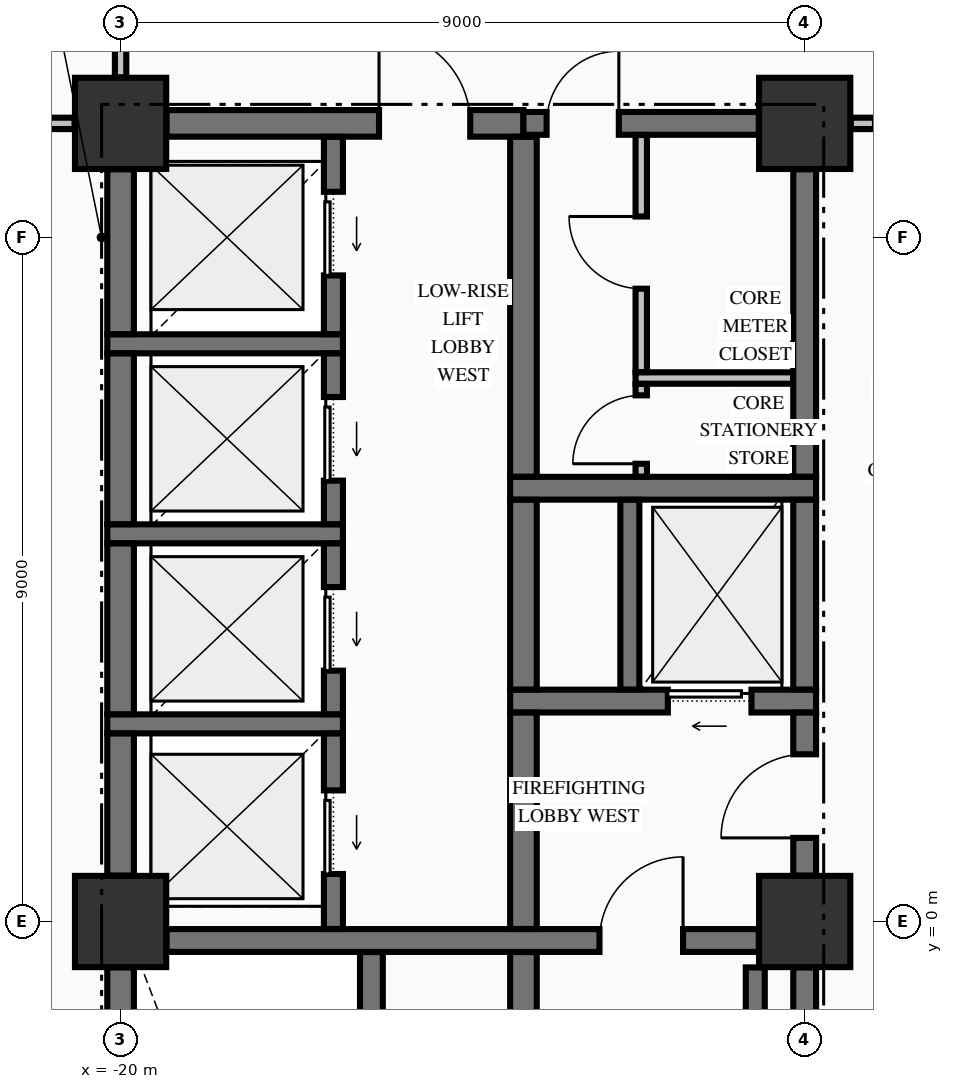
"""IFC4 building model, lengths in metres.
Left out: names, types, materials, properties, quantities, classifications, styles, units other than length and angle.
Written with IfcOpenShell. Run it as: python <this file> out.ifc"""

import sys

from ifc_helpers import new_model, si_unit, direction, frame, frame_2d, origin, origin_2d, place, context, subcontext, project, spatial, rectangle, extrude, element, fill, save


model = new_model("IFC4")
c1 = context("Model", 3, precision=1e-05, world=origin(), true_north=direction((0.0, 1.0)))
c2 = subcontext(c1, "Body", "Model", "MODEL_VIEW")
j1 = project(units=[si_unit("LENGTHUNIT", "METRE"), si_unit("PLANEANGLEUNIT", "RADIAN")], contexts=[c1])
p1 = place(None, origin())
s1 = spatial("IfcSite", under=j1, at=p1, CompositionType="ELEMENT")
p2 = place(p1, origin())
s2 = spatial("IfcBuilding", under=s1, at=p2, CompositionType="ELEMENT")
p3 = place(p2, frame((0.0, 0.0, 71.47)))
s3 = spatial("IfcBuildingStorey", under=s2, at=p3, CompositionType="ELEMENT", Elevation=71.47)
for number, where, z_axis, x_axis in (
    (1, (-20.0, 10.5, -0.325), (0.0, 0.0, 1.0), (1.0, 0.0, 0.0)),
    (2, (-11.0, 0.0, -0.325), (0.0, 0.0, 1.0), (1.0, 0.0, 0.0)),
    (3, (-11.0, 10.5, -0.325), (0.0, 0.0, 1.0), (1.0, 0.0, 0.0)),
    (4, (-20.0, 0.0, -0.325), (0.0, 0.0, 1.0), (1.0, 0.0, 0.0)),
):
    element("IfcColumn", number, at=place(p3, frame(where, z_axis=z_axis, x_axis=x_axis)), inside=s3, PredefinedType="COLUMN", context=c2, shape_type="SweptSolid", body=[
        extrude(rectangle(XDim=1.2, YDim=1.2, at=origin_2d()), origin(), (0.0, 0.0, 1.0), 3.645),
    ])
p4 = place(p3, frame((-19.396, -0.25, 0.0), z_axis=(0.0, 0.0, 1.0), x_axis=(1.0, 0.0, 0.0)))
e5 = element("IfcWall", 5, at=p4, inside=s3, PredefinedType="SHEAR", context=c2, shape_type="SweptSolid", body=[
    extrude(rectangle(XDim=7.792, YDim=0.3, at=frame_2d((3.896, 0.0))), origin(), (0.0, 0.0, 1.0), 3.32),
])
p5 = place(p4, frame((5.696, 0.0, 0.0)))
e6 = element("IfcOpeningElement", 6, at=p5, cuts=e5, PredefinedType="OPENING", context=c2, shape_type="SweptSolid", body=[
    extrude(rectangle(XDim=1.1, YDim=2.15, at=frame_2d((0.55, 1.075))), frame((0.0, 0.16, 0.0), z_axis=(0.0, -1.0, 0.0), x_axis=(1.0, 0.0, 0.0)), (0.0, 0.0, 1.0), 0.32),
])
p6 = place(p3, frame((-20.175, 2.6, 0.0), z_axis=(0.0, 0.0, 1.0), x_axis=(1.0, 0.0, 0.0)))
e7 = element("IfcWall", 7, at=p6, inside=s3, PredefinedType="SOLIDWALL", context=c2, shape_type="SweptSolid", body=[
    extrude(rectangle(XDim=3.1, YDim=0.25, at=frame_2d((1.55, 0.0))), origin(), (0.0, 0.0, 1.0), 3.32),
])
p7 = place(p3, frame((-14.875, 2.9, 0.0), z_axis=(0.0, 0.0, 1.0), x_axis=(1.0, 0.0, 0.0)))
e8 = element("IfcWall", 8, at=p7, inside=s3, PredefinedType="SHEAR", context=c2, shape_type="SweptSolid", body=[
    extrude(rectangle(XDim=4.025, YDim=0.3, at=frame_2d((2.012, 0.0))), origin(), (0.0, 0.0, 1.0), 3.32),
])
p8 = place(p7, frame((2.075, 0.0, 0.0)))
e9 = element("IfcOpeningElement", 9, at=p8, cuts=e8, PredefinedType="OPENING", context=c2, shape_type="SweptSolid", body=[
    extrude(rectangle(XDim=1.1, YDim=2.2, at=frame_2d((0.55, 1.1))), frame((0.0, 0.16, 0.0), z_axis=(0.0, -1.0, 0.0), x_axis=(1.0, 0.0, 0.0)), (0.0, 0.0, 1.0), 0.32),
])
p9 = place(p3, frame((-20.175, 5.1, 0.0), z_axis=(0.0, 0.0, 1.0), x_axis=(1.0, 0.0, 0.0)))
e10 = element("IfcWall", 10, at=p9, inside=s3, PredefinedType="SOLIDWALL", context=c2, shape_type="SweptSolid", body=[
    extrude(rectangle(XDim=3.1, YDim=0.25, at=frame_2d((1.55, 0.0))), origin(), (0.0, 0.0, 1.0), 3.32),
])
p10 = place(p3, frame((-14.875, 5.7, 0.0), z_axis=(0.0, 0.0, 1.0), x_axis=(1.0, 0.0, 0.0)))
e11 = element("IfcWall", 11, at=p10, inside=s3, PredefinedType="SHEAR", context=c2, shape_type="SweptSolid", body=[
    extrude(rectangle(XDim=4.025, YDim=0.3, at=frame_2d((2.012, 0.0))), origin(), (0.0, 0.0, 1.0), 3.32),
])
p11 = place(p3, frame((-20.175, 7.6, 0.0), z_axis=(0.0, 0.0, 1.0), x_axis=(1.0, 0.0, 0.0)))
e12 = element("IfcWall", 12, at=p11, inside=s3, PredefinedType="SOLIDWALL", context=c2, shape_type="SweptSolid", body=[
    extrude(rectangle(XDim=3.1, YDim=0.25, at=frame_2d((1.55, 0.0))), origin(), (0.0, 0.0, 1.0), 3.32),
])
p12 = place(p3, frame((-19.396, 10.5, 0.0), z_axis=(0.0, 0.0, 1.0), x_axis=(1.0, 0.0, 0.0)))
e13 = element("IfcWall", 13, at=p12, inside=s3, PredefinedType="SHEAR", context=c2, shape_type="SweptSolid", body=[
    extrude(rectangle(XDim=4.696, YDim=0.35, at=frame_2d((2.348, 0.0))), origin(), (0.0, 0.0, 1.0), 3.32),
])
p13 = place(p12, frame((2.796, 0.0, 0.0)))
e14 = element("IfcOpeningElement", 14, at=p13, cuts=e13, PredefinedType="OPENING", context=c2, shape_type="SweptSolid", body=[
    extrude(rectangle(XDim=1.2, YDim=2.15, at=frame_2d((0.6, 1.075))), frame((0.0, 0.185, 0.0), z_axis=(0.0, -1.0, 0.0), x_axis=(1.0, 0.0, 0.0)), (0.0, 0.0, 1.0), 0.37),
])
p14 = place(p3, frame((-14.7, 10.5, 0.0), z_axis=(0.0, 0.0, 1.0), x_axis=(1.0, 0.0, 0.0)))
e15 = element("IfcWall", 15, at=p14, inside=s3, PredefinedType="SHEAR", context=c2, shape_type="SweptSolid", body=[
    extrude(rectangle(XDim=3.096, YDim=0.3, at=frame_2d((1.548, 0.0))), origin(), (0.0, 0.0, 1.0), 3.32),
])
p15 = place(p14, frame((0.305, 0.0, 0.0)))
e16 = element("IfcOpeningElement", 16, at=p15, cuts=e15, PredefinedType="OPENING", context=c2, shape_type="SweptSolid", body=[
    extrude(rectangle(XDim=0.95, YDim=2.15, at=frame_2d((0.475, 1.075))), frame((0.0, 0.16, 0.0), z_axis=(0.0, -1.0, 0.0), x_axis=(1.0, 0.0, 0.0)), (0.0, 0.0, 1.0), 0.32),
])
p16 = place(p3, frame((-13.225, 7.15, 0.0), z_axis=(0.0, 0.0, 1.0), x_axis=(1.0, 0.0, 0.0)))
e17 = element("IfcWall", 17, at=p16, inside=s3, PredefinedType="PARTITIONING", context=c2, shape_type="SweptSolid", body=[
    extrude(rectangle(XDim=2.072, YDim=0.15, at=frame_2d((1.036, 0.0))), origin(), (0.0, 0.0, 1.0), 3.32),
])
p17 = place(p3, frame((-28.835, 10.5, 0.0), z_axis=(0.0, 0.0, 1.0), x_axis=(1.0, 0.0, 0.0)))
e18 = element("IfcWall", 18, at=p17, inside=s3, PredefinedType="PARTITIONING", context=c2, shape_type="SweptSolid", body=[
    extrude(rectangle(XDim=8.229, YDim=0.15, at=frame_2d((4.115, 0.0))), origin(), (0.0, 0.0, 1.0), 3.32),
])
p18 = place(p17, frame((3.86, 0.0, 0.0)))
e19 = element("IfcOpeningElement", 19, at=p18, cuts=e18, PredefinedType="OPENING", context=c2, shape_type="SweptSolid", body=[
    extrude(rectangle(XDim=0.95, YDim=2.15, at=frame_2d((0.475, 1.075))), frame((0.0, 0.085, 0.0), z_axis=(0.0, -1.0, 0.0), x_axis=(1.0, 0.0, 0.0)), (0.0, 0.0, 1.0), 0.17),
])
p19 = place(p3, frame((-10.394, 10.5, 0.0), z_axis=(0.0, 0.0, 1.0), x_axis=(1.0, 0.0, 0.0)))
e20 = element("IfcWall", 20, at=p19, inside=s3, PredefinedType="PARTITIONING", context=c2, shape_type="SweptSolid", body=[
    extrude(rectangle(XDim=20.788, YDim=0.15, at=frame_2d((10.394, 0.0))), origin(), (0.0, 0.0, 1.0), 3.32),
])
p20 = place(p19, frame((0.319, 0.0, 0.0)))
e21 = element("IfcOpeningElement", 21, at=p20, cuts=e20, PredefinedType="OPENING", context=c2, shape_type="SweptSolid", body=[
    extrude(rectangle(XDim=1.05, YDim=2.15, at=frame_2d((0.525, 1.075))), frame((0.0, 0.085, 0.0), z_axis=(0.0, -1.0, 0.0), x_axis=(1.0, 0.0, 0.0)), (0.0, 0.0, 1.0), 0.17),
])
p21 = place(p19, frame((19.419, 0.0, 0.0)))
e22 = element("IfcOpeningElement", 22, at=p21, cuts=e20, PredefinedType="OPENING", context=c2, shape_type="SweptSolid", body=[
    extrude(rectangle(XDim=1.05, YDim=2.15, at=frame_2d((0.525, 1.075))), frame((0.0, 0.085, 0.0), z_axis=(0.0, -1.0, 0.0), x_axis=(1.0, 0.0, 0.0)), (0.0, 0.0, 1.0), 0.17),
])
p22 = place(p3, frame((-20.0, -9.346, 0.0), z_axis=(0.0, 0.0, 1.0), x_axis=(0.0, 1.0, 0.0)))
e23 = element("IfcWall", 23, at=p22, inside=s3, PredefinedType="SHEAR", context=c2, shape_type="SweptSolid", body=[
    extrude(rectangle(XDim=8.742, YDim=0.35, at=frame_2d((4.371, 0.0))), origin(), (0.0, 0.0, 1.0), 3.32),
])
p23 = place(p3, frame((-20.0, 0.604, 0.0), z_axis=(0.0, 0.0, 1.0), x_axis=(0.0, 1.0, 0.0)))
e24 = element("IfcWall", 24, at=p23, inside=s3, PredefinedType="SHEAR", context=c2, shape_type="SweptSolid", body=[
    extrude(rectangle(XDim=1.869, YDim=0.35, at=frame_2d((0.935, 0.0))), origin(), (0.0, 0.0, 1.0), 3.32),
])
for number, where, z_axis, x_axis in (
    (25, (-20.0, 2.727, 0.0), (0.0, 0.0, 1.0), (0.0, 1.0, 0.0)),
    (26, (-20.0, 5.227, 0.0), (0.0, 0.0, 1.0), (0.0, 1.0, 0.0)),
):
    element("IfcWall", number, at=place(p3, frame(where, z_axis=z_axis, x_axis=x_axis)), inside=s3, PredefinedType="SHEAR", context=c2, shape_type="SweptSolid", body=[
        extrude(rectangle(XDim=2.246, YDim=0.35, at=frame_2d((1.123, 0.0))), origin(), (0.0, 0.0, 1.0), 3.32),
    ])
p24 = place(p3, frame((-20.0, 7.727, 0.0), z_axis=(0.0, 0.0, 1.0), x_axis=(0.0, 1.0, 0.0)))
e27 = element("IfcWall", 27, at=p24, inside=s3, PredefinedType="SHEAR", context=c2, shape_type="SweptSolid", body=[
    extrude(rectangle(XDim=2.169, YDim=0.35, at=frame_2d((1.084, 0.0))), origin(), (0.0, 0.0, 1.0), 3.32),
])
p25 = place(p3, frame((-17.2, -0.098, 0.0), z_axis=(0.0, 0.0, 1.0), x_axis=(0.0, 1.0, 0.0)))
e28 = element("IfcWall", 28, at=p25, inside=s3, PredefinedType="SOLIDWALL", context=c2, shape_type="SweptSolid", body=[
    extrude(rectangle(XDim=2.571, YDim=0.25, at=frame_2d((1.285, 0.0))), origin(), (0.0, 0.0, 1.0), 3.32),
])
p26 = place(p25, frame((0.723, 0.0, 0.0)))
e29 = element("IfcOpeningElement", 29, at=p26, cuts=e28, PredefinedType="OPENING", context=c2, shape_type="SweptSolid", body=[
    extrude(rectangle(XDim=1.1, YDim=2.2, at=frame_2d((0.55, 1.1))), frame((0.0, 0.135, 0.0), z_axis=(0.0, -1.0, 0.0), x_axis=(1.0, 0.0, 0.0)), (0.0, 0.0, 1.0), 0.27),
])
p27 = place(p3, frame((-17.2, 2.727, 0.0), z_axis=(0.0, 0.0, 1.0), x_axis=(0.0, 1.0, 0.0)))
e30 = element("IfcWall", 30, at=p27, inside=s3, PredefinedType="SOLIDWALL", context=c2, shape_type="SweptSolid", body=[
    extrude(rectangle(XDim=2.246, YDim=0.25, at=frame_2d((1.123, 0.0))), origin(), (0.0, 0.0, 1.0), 3.32),
])
p28 = place(p27, frame((0.573, 0.0, 0.0)))
e31 = element("IfcOpeningElement", 31, at=p28, cuts=e30, PredefinedType="OPENING", context=c2, shape_type="SweptSolid", body=[
    extrude(rectangle(XDim=1.1, YDim=2.2, at=frame_2d((0.55, 1.1))), frame((0.0, 0.135, 0.0), z_axis=(0.0, -1.0, 0.0), x_axis=(1.0, 0.0, 0.0)), (0.0, 0.0, 1.0), 0.27),
])
p29 = place(p3, frame((-17.2, 5.227, 0.0), z_axis=(0.0, 0.0, 1.0), x_axis=(0.0, 1.0, 0.0)))
e32 = element("IfcWall", 32, at=p29, inside=s3, PredefinedType="SOLIDWALL", context=c2, shape_type="SweptSolid", body=[
    extrude(rectangle(XDim=2.246, YDim=0.25, at=frame_2d((1.123, 0.0))), origin(), (0.0, 0.0, 1.0), 3.32),
])
p30 = place(p29, frame((0.573, 0.0, 0.0)))
e33 = element("IfcOpeningElement", 33, at=p30, cuts=e32, PredefinedType="OPENING", context=c2, shape_type="SweptSolid", body=[
    extrude(rectangle(XDim=1.1, YDim=2.2, at=frame_2d((0.55, 1.1))), frame((0.0, 0.135, 0.0), z_axis=(0.0, -1.0, 0.0), x_axis=(1.0, 0.0, 0.0)), (0.0, 0.0, 1.0), 0.27),
])
p31 = place(p3, frame((-17.2, 7.727, 0.0), z_axis=(0.0, 0.0, 1.0), x_axis=(0.0, 1.0, 0.0)))
e34 = element("IfcWall", 34, at=p31, inside=s3, PredefinedType="SOLIDWALL", context=c2, shape_type="SweptSolid", body=[
    extrude(rectangle(XDim=2.596, YDim=0.25, at=frame_2d((1.298, 0.0))), origin(), (0.0, 0.0, 1.0), 3.32),
])
p32 = place(p31, frame((0.773, 0.0, 0.0)))
e35 = element("IfcOpeningElement", 35, at=p32, cuts=e34, PredefinedType="OPENING", context=c2, shape_type="SweptSolid", body=[
    extrude(rectangle(XDim=1.1, YDim=2.2, at=frame_2d((0.55, 1.1))), frame((0.0, 0.135, 0.0), z_axis=(0.0, -1.0, 0.0), x_axis=(1.0, 0.0, 0.0)), (0.0, 0.0, 1.0), 0.27),
])
p33 = place(p3, frame((-16.7, -9.773, 0.0), z_axis=(0.0, 0.0, 1.0), x_axis=(0.0, 1.0, 0.0)))
e36 = element("IfcWall", 36, at=p33, inside=s3, PredefinedType="SHEAR", context=c2, shape_type="SweptSolid", body=[
    extrude(rectangle(XDim=9.371, YDim=0.3, at=frame_2d((4.686, 0.0))), origin(), (0.0, 0.0, 1.0), 3.32),
])
p34 = place(p3, frame((-14.7, -9.773, 0.0), z_axis=(0.0, 0.0, 1.0), x_axis=(0.0, 1.0, 0.0)))
e37 = element("IfcWall", 37, at=p34, inside=s3, PredefinedType="SHEAR", context=c2, shape_type="SweptSolid", body=[
    extrude(rectangle(XDim=9.371, YDim=0.35, at=frame_2d((4.686, 0.0))), origin(), (0.0, 0.0, 1.0), 3.32),
])
p35 = place(p3, frame((-14.7, -0.098, 0.0), z_axis=(0.0, 0.0, 1.0), x_axis=(0.0, 1.0, 0.0)))
e38 = element("IfcWall", 38, at=p35, inside=s3, PredefinedType="SHEAR", context=c2, shape_type="SweptSolid", body=[
    extrude(rectangle(XDim=2.846, YDim=0.35, at=frame_2d((1.423, 0.0))), origin(), (0.0, 0.0, 1.0), 3.32),
])
p36 = place(p3, frame((-14.7, 3.052, 0.0), z_axis=(0.0, 0.0, 1.0), x_axis=(0.0, 1.0, 0.0)))
e39 = element("IfcWall", 39, at=p36, inside=s3, PredefinedType="SHEAR", context=c2, shape_type="SweptSolid", body=[
    extrude(rectangle(XDim=2.496, YDim=0.35, at=frame_2d((1.248, 0.0))), origin(), (0.0, 0.0, 1.0), 3.32),
])
p37 = place(p3, frame((-14.7, 5.852, 0.0), z_axis=(0.0, 0.0, 1.0), x_axis=(0.0, 1.0, 0.0)))
e40 = element("IfcWall", 40, at=p37, inside=s3, PredefinedType="SHEAR", context=c2, shape_type="SweptSolid", body=[
    extrude(rectangle(XDim=4.471, YDim=0.35, at=frame_2d((2.235, 0.0))), origin(), (0.0, 0.0, 1.0), 3.32),
])
p38 = place(p3, frame((-13.3, 3.052, 0.0), z_axis=(0.0, 0.0, 1.0), x_axis=(0.0, 1.0, 0.0)))
e41 = element("IfcWall", 41, at=p38, inside=s3, PredefinedType="SOLIDWALL", context=c2, shape_type="SweptSolid", body=[
    extrude(rectangle(XDim=2.496, YDim=0.25, at=frame_2d((1.248, 0.0))), origin(), (0.0, 0.0, 1.0), 3.32),
])
p39 = place(p3, frame((-11.65, -9.346, 0.0), z_axis=(0.0, 0.0, 1.0), x_axis=(0.0, 1.0, 0.0)))
e42 = element("IfcWall", 42, at=p39, inside=s3, PredefinedType="SOLIDWALL", context=c2, shape_type="SweptSolid", body=[
    extrude(rectangle(XDim=8.742, YDim=0.25, at=frame_2d((4.371, 0.0))), origin(), (0.0, 0.0, 1.0), 3.32),
])
p40 = place(p3, frame((-11.0, -9.346, 0.0), z_axis=(0.0, 0.0, 1.0), x_axis=(0.0, 1.0, 0.0)))
e43 = element("IfcWall", 43, at=p40, inside=s3, PredefinedType="SHEAR", context=c2, shape_type="SweptSolid", body=[
    extrude(rectangle(XDim=8.742, YDim=0.3, at=frame_2d((4.371, 0.0))), origin(), (0.0, 0.0, 1.0), 3.32),
])
p41 = place(p3, frame((-11.0, 0.604, 0.0), z_axis=(0.0, 0.0, 1.0), x_axis=(0.0, 1.0, 0.0)))
e44 = element("IfcWall", 44, at=p41, inside=s3, PredefinedType="SHEAR", context=c2, shape_type="SweptSolid", body=[
    extrude(rectangle(XDim=2.144, YDim=0.3, at=frame_2d((1.072, 0.0))), origin(), (0.0, 0.0, 1.0), 3.32),
])
p42 = place(p41, frame((0.496, 0.0, 0.0)))
e45 = element("IfcOpeningElement", 45, at=p42, cuts=e44, PredefinedType="OPENING", context=c2, shape_type="SweptSolid", body=[
    extrude(rectangle(XDim=1.1, YDim=2.15, at=frame_2d((0.55, 1.075))), frame((0.0, 0.16, 0.0), z_axis=(0.0, -1.0, 0.0), x_axis=(1.0, 0.0, 0.0)), (0.0, 0.0, 1.0), 0.32),
])
p43 = place(p3, frame((-11.0, 3.052, 0.0), z_axis=(0.0, 0.0, 1.0), x_axis=(0.0, 1.0, 0.0)))
e46 = element("IfcWall", 46, at=p43, inside=s3, PredefinedType="SHEAR", context=c2, shape_type="SweptSolid", body=[
    extrude(rectangle(XDim=2.496, YDim=0.3, at=frame_2d((1.248, 0.0))), origin(), (0.0, 0.0, 1.0), 3.32),
])
p44 = place(p3, frame((-11.0, 5.852, 0.0), z_axis=(0.0, 0.0, 1.0), x_axis=(0.0, 1.0, 0.0)))
e47 = element("IfcWall", 47, at=p44, inside=s3, PredefinedType="SHEAR", context=c2, shape_type="SweptSolid", body=[
    extrude(rectangle(XDim=4.044, YDim=0.3, at=frame_2d((2.022, 0.0))), origin(), (0.0, 0.0, 1.0), 3.32),
])
p45 = place(p3, frame((-20.0, 11.106, 0.0), z_axis=(0.0, 0.0, 1.0), x_axis=(0.0, 1.0, 0.0)))
e48 = element("IfcWall", 48, at=p45, inside=s3, PredefinedType="PARTITIONING", context=c2, shape_type="SweptSolid", body=[
    extrude(rectangle(XDim=2.616, YDim=0.15, at=frame_2d((1.308, 0.0))), origin(), (0.0, 0.0, 1.0), 2.66),
])
p46 = place(p45, frame((0.569, 0.0, 0.0)))
e49 = element("IfcOpeningElement", 49, at=p46, cuts=e48, PredefinedType="OPENING", context=c2, shape_type="SweptSolid", body=[
    extrude(rectangle(XDim=0.95, YDim=2.15, at=frame_2d((0.475, 1.075))), frame((0.0, 0.085, 0.0), z_axis=(0.0, -1.0, 0.0), x_axis=(1.0, 0.0, 0.0)), (0.0, 0.0, 1.0), 0.17),
])
p47 = place(p3, frame((-13.15, 5.853, 0.0), z_axis=(0.0, 0.0, 1.0), x_axis=(0.0, 1.0, 0.0)))
e50 = element("IfcWall", 50, at=p47, inside=s3, PredefinedType="PARTITIONING", context=c2, shape_type="SweptSolid", body=[
    extrude(rectangle(XDim=1.219, YDim=0.15, at=frame_2d((0.609, 0.0))), origin(), (0.0, 0.0, 1.0), 3.32),
])
p48 = place(p47, frame((0.169, 0.0, 0.0)))
e51 = element("IfcOpeningElement", 51, at=p48, cuts=e50, PredefinedType="OPENING", context=c2, shape_type="SweptSolid", body=[
    extrude(rectangle(XDim=0.9, YDim=2.15, at=frame_2d((0.45, 1.075))), frame((0.0, 0.085, 0.0), z_axis=(0.0, -1.0, 0.0), x_axis=(1.0, 0.0, 0.0)), (0.0, 0.0, 1.0), 0.17),
])
p49 = place(p3, frame((-13.15, 7.228, 0.0), z_axis=(0.0, 0.0, 1.0), x_axis=(0.0, 1.0, 0.0)))
e52 = element("IfcWall", 52, at=p49, inside=s3, PredefinedType="PARTITIONING", context=c2, shape_type="SweptSolid", body=[
    extrude(rectangle(XDim=3.119, YDim=0.15, at=frame_2d((1.56, 0.0))), origin(), (0.0, 0.0, 1.0), 3.32),
])
p50 = place(p49, frame((1.097, 0.0, 0.0)))
e53 = element("IfcOpeningElement", 53, at=p50, cuts=e52, PredefinedType="OPENING", context=c2, shape_type="SweptSolid", body=[
    extrude(rectangle(XDim=0.95, YDim=2.15, at=frame_2d((0.475, 1.075))), frame((0.0, 0.085, 0.0), z_axis=(0.0, -1.0, 0.0), x_axis=(1.0, 0.0, 0.0)), (0.0, 0.0, 1.0), 0.17),
])
p51 = place(p5, origin())
e54 = element("IfcDoor", 54, at=p51, inside=s3, OperationType="SINGLE_SWING_RIGHT", PredefinedType="DOOR", context=c2, shape_type="SweptSolid", body=[
    extrude(rectangle(XDim=1.1, YDim=2.15, at=frame_2d((0.55, 1.075))), frame((0.0, 0.025, 0.0), z_axis=(0.0, -1.0, 0.0), x_axis=(1.0, 0.0, 0.0)), (0.0, 0.0, 1.0), 0.05),
])
fill(e6, e54)
p52 = place(p42, origin())
e55 = element("IfcDoor", 55, at=p52, inside=s3, OperationType="SINGLE_SWING_LEFT", PredefinedType="DOOR", context=c2, shape_type="SweptSolid", body=[
    extrude(rectangle(XDim=1.1, YDim=2.15, at=frame_2d((0.55, 1.075))), frame((0.0, 0.025, 0.0), z_axis=(0.0, -1.0, 0.0), x_axis=(1.0, 0.0, 0.0)), (0.0, 0.0, 1.0), 0.05),
])
fill(e45, e55)
p53 = place(p8, origin())
e56 = element("IfcDoor", 56, at=p53, inside=s3, OperationType="SLIDING_TO_LEFT", PredefinedType="DOOR", context=c2, shape_type="SweptSolid", body=[
    extrude(rectangle(XDim=1.1, YDim=2.2, at=frame_2d((0.55, 1.1))), frame((0.0, 0.025, 0.0), z_axis=(0.0, -1.0, 0.0), x_axis=(1.0, 0.0, 0.0)), (0.0, 0.0, 1.0), 0.05),
])
fill(e9, e56)
p54 = place(p15, origin())
e57 = element("IfcDoor", 57, at=p54, inside=s3, OperationType="SINGLE_SWING_RIGHT", PredefinedType="DOOR", context=c2, shape_type="SweptSolid", body=[
    extrude(rectangle(XDim=0.95, YDim=2.15, at=frame_2d((0.475, 1.075))), frame((0.0, 0.025, 0.0), z_axis=(0.0, -1.0, 0.0), x_axis=(1.0, 0.0, 0.0)), (0.0, 0.0, 1.0), 0.05),
])
fill(e16, e57)
p55 = place(p48, origin())
e58 = element("IfcDoor", 58, at=p55, inside=s3, OperationType="SINGLE_SWING_LEFT", PredefinedType="DOOR", context=c2, shape_type="SweptSolid", body=[
    extrude(rectangle(XDim=0.9, YDim=2.15, at=frame_2d((0.45, 1.075))), frame((0.0, 0.025, 0.0), z_axis=(0.0, -1.0, 0.0), x_axis=(1.0, 0.0, 0.0)), (0.0, 0.0, 1.0), 0.05),
])
fill(e51, e58)
p56 = place(p50, origin())
e59 = element("IfcDoor", 59, at=p56, inside=s3, OperationType="SINGLE_SWING_RIGHT", PredefinedType="DOOR", context=c2, shape_type="SweptSolid", body=[
    extrude(rectangle(XDim=0.95, YDim=2.15, at=frame_2d((0.475, 1.075))), frame((0.0, 0.025, 0.0), z_axis=(0.0, -1.0, 0.0), x_axis=(1.0, 0.0, 0.0)), (0.0, 0.0, 1.0), 0.05),
])
fill(e53, e59)
p57 = place(p13, origin())
e60 = element("IfcDoor", 60, at=p57, inside=s3, OperationType="SINGLE_SWING_LEFT", PredefinedType="DOOR", context=c2, shape_type="SweptSolid", body=[
    extrude(rectangle(XDim=1.2, YDim=2.15, at=frame_2d((0.6, 1.075))), frame((0.0, 0.025, 0.0), z_axis=(0.0, -1.0, 0.0), x_axis=(1.0, 0.0, 0.0)), (0.0, 0.0, 1.0), 0.05),
])
fill(e14, e60)
p58 = place(p26, origin())
e61 = element("IfcDoor", 61, at=p58, inside=s3, OperationType="SLIDING_TO_LEFT", PredefinedType="DOOR", context=c2, shape_type="SweptSolid", body=[
    extrude(rectangle(XDim=1.1, YDim=2.2, at=frame_2d((0.55, 1.1))), frame((0.0, 0.025, 0.0), z_axis=(0.0, -1.0, 0.0), x_axis=(1.0, 0.0, 0.0)), (0.0, 0.0, 1.0), 0.05),
])
fill(e29, e61)
p59 = place(p28, origin())
e62 = element("IfcDoor", 62, at=p59, inside=s3, OperationType="SLIDING_TO_LEFT", PredefinedType="DOOR", context=c2, shape_type="SweptSolid", body=[
    extrude(rectangle(XDim=1.1, YDim=2.2, at=frame_2d((0.55, 1.1))), frame((0.0, 0.025, 0.0), z_axis=(0.0, -1.0, 0.0), x_axis=(1.0, 0.0, 0.0)), (0.0, 0.0, 1.0), 0.05),
])
fill(e31, e62)
p60 = place(p30, origin())
e63 = element("IfcDoor", 63, at=p60, inside=s3, OperationType="SLIDING_TO_LEFT", PredefinedType="DOOR", context=c2, shape_type="SweptSolid", body=[
    extrude(rectangle(XDim=1.1, YDim=2.2, at=frame_2d((0.55, 1.1))), frame((0.0, 0.025, 0.0), z_axis=(0.0, -1.0, 0.0), x_axis=(1.0, 0.0, 0.0)), (0.0, 0.0, 1.0), 0.05),
])
fill(e33, e63)
p61 = place(p32, origin())
e64 = element("IfcDoor", 64, at=p61, inside=s3, OperationType="SLIDING_TO_LEFT", PredefinedType="DOOR", context=c2, shape_type="SweptSolid", body=[
    extrude(rectangle(XDim=1.1, YDim=2.2, at=frame_2d((0.55, 1.1))), frame((0.0, 0.025, 0.0), z_axis=(0.0, -1.0, 0.0), x_axis=(1.0, 0.0, 0.0)), (0.0, 0.0, 1.0), 0.05),
])
fill(e35, e64)
save(model, sys.argv[1])
